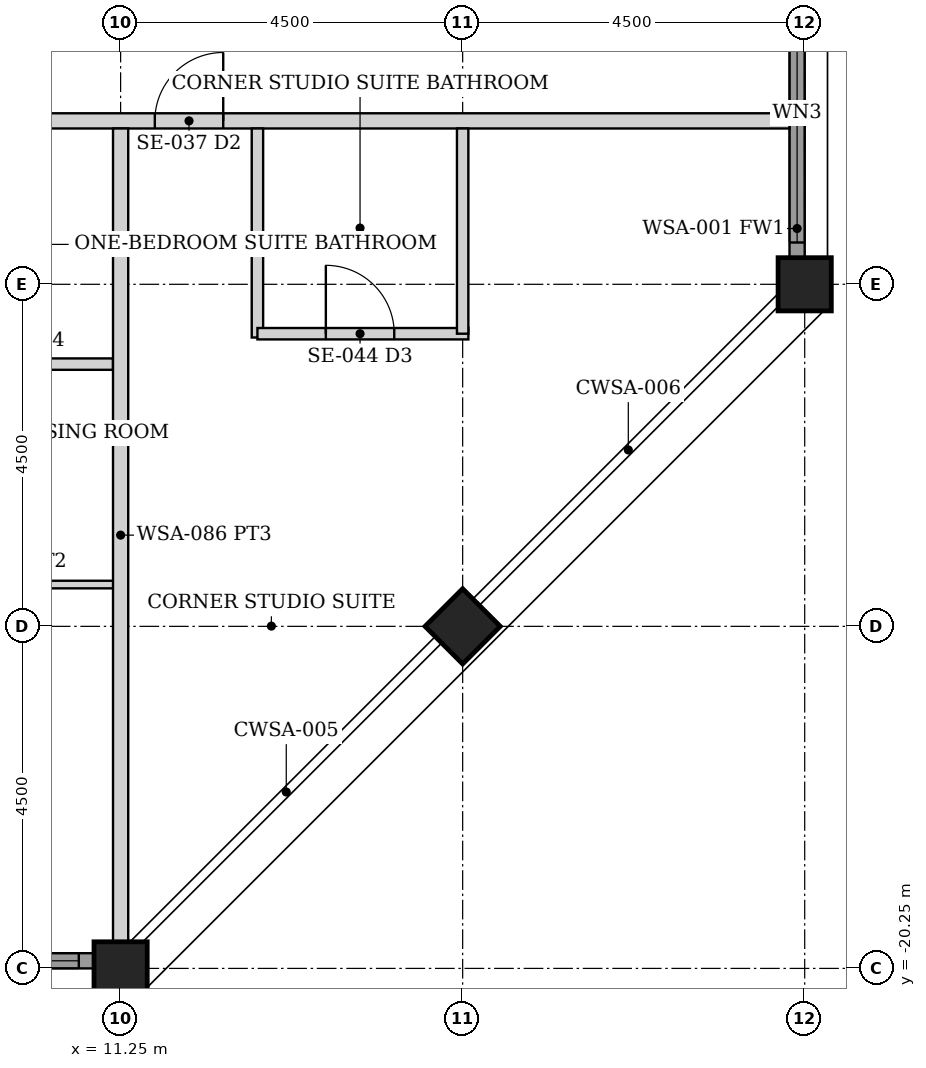
"""IFC4 building model, lengths in metres.
Left out: names, types, materials, properties, quantities, classifications, styles, units other than length and angle.
Written with IfcOpenShell. Run it as: python <this file> out.ifc"""

import sys

from ifc_helpers import new_model, si_unit, direction, frame, frame_2d, origin, origin_2d, place, context, subcontext, project, spatial, rectangle, hollow_rectangle, extrude, element, fill, save


model = new_model("IFC4")
c1 = context("Model", 3, precision=1e-05, world=origin(), true_north=direction((0.0, 1.0)))
c2 = subcontext(c1, "Body", "Model", "MODEL_VIEW")
j1 = project(units=[si_unit("LENGTHUNIT", "METRE"), si_unit("PLANEANGLEUNIT", "RADIAN")], contexts=[c1])
p1 = place(None, origin())
s1 = spatial("IfcSite", under=j1, at=p1, CompositionType="ELEMENT")
p2 = place(p1, origin())
s2 = spatial("IfcBuilding", under=s1, at=p2, CompositionType="ELEMENT")
p3 = place(p2, frame((0.0, 0.0, 245.8)))
s3 = spatial("IfcBuildingStorey", under=s2, at=p3, CompositionType="ELEMENT", Elevation=245.8)
for number, where, z_axis, x_axis in (
    (1, (20.25, -11.25, 0.0), (0.0, 0.0, 1.0), (1.0, 0.0, 0.0)),
    (2, (11.25, -20.25, 0.0), (0.0, 0.0, 1.0), (0.0, 1.0, 0.0)),
    (3, (15.75, -15.75, 0.0), (0.0, 0.0, 1.0), (0.707, -0.707, 0.0)),
):
    element("IfcColumn", number, at=place(p3, frame(where, z_axis=z_axis, x_axis=x_axis)), inside=s3, PredefinedType="COLUMN", context=c2, shape_type="SweptSolid", body=[
        extrude(hollow_rectangle(XDim=0.7, YDim=0.7, WallThickness=0.035, at=origin_2d()), origin(), (0.0, 0.0, 1.0), 3.75),
    ])
p4 = place(p3, frame((7.105, -20.15, 0.0), z_axis=(0.0, 0.0, 1.0), x_axis=(1.0, 0.0, 0.0)))
e4 = element("IfcWall", 4, at=p4, inside=s3, PredefinedType="SOLIDWALL", context=c2, shape_type="SweptSolid", body=[
    extrude(rectangle(XDim=3.79, YDim=0.2, at=frame_2d((1.895, 0.0))), origin(), (0.0, 0.0, 1.0), 2.629),
])
p5 = place(p4, frame((0.195, 0.0, 0.3)))
e5 = element("IfcOpeningElement", 5, at=p5, cuts=e4, PredefinedType="OPENING", context=c2, shape_type="SweptSolid", body=[
    extrude(rectangle(XDim=3.4, YDim=2.179, at=frame_2d((1.7, 1.089))), frame((0.0, 0.11, 0.0), z_axis=(0.0, -1.0, 0.0), x_axis=(1.0, 0.0, 0.0)), (0.0, 0.0, 1.0), 0.22),
])
p6 = place(p3, frame((20.15, -10.895, 0.0), z_axis=(0.0, 0.0, 1.0), x_axis=(0.0, 1.0, 0.0)))
e6 = element("IfcWall", 6, at=p6, inside=s3, PredefinedType="SOLIDWALL", context=c2, shape_type="SweptSolid", body=[
    extrude(rectangle(XDim=3.79, YDim=0.2, at=frame_2d((1.895, 0.0))), origin(), (0.0, 0.0, 1.0), 2.629),
])
p7 = place(p6, frame((0.195, 0.0, 0.3)))
e7 = element("IfcOpeningElement", 7, at=p7, cuts=e6, PredefinedType="OPENING", context=c2, shape_type="SweptSolid", body=[
    extrude(rectangle(XDim=3.4, YDim=2.179, at=frame_2d((1.7, 1.089))), frame((0.0, 0.11, 0.0), z_axis=(0.0, -1.0, 0.0), x_axis=(1.0, 0.0, 0.0)), (0.0, 0.0, 1.0), 0.22),
])
p8 = place(p3, frame((-20.05, -9.1, 0.0), z_axis=(0.0, 0.0, 1.0), x_axis=(1.0, 0.0, 0.0)))
e8 = element("IfcWall", 8, at=p8, inside=s3, PredefinedType="PARTITIONING", context=c2, shape_type="SweptSolid", body=[
    extrude(rectangle(XDim=40.1, YDim=0.2, at=frame_2d((20.05, 0.0))), origin(), (0.0, 0.0, 1.0), 2.629),
])
p9 = place(p8, frame((14.05, 0.0, 0.0)))
e9 = element("IfcOpeningElement", 9, at=p9, cuts=e8, PredefinedType="OPENING", context=c2, shape_type="SweptSolid", body=[
    extrude(rectangle(XDim=0.9, YDim=2.1, at=frame_2d((0.45, 1.05))), frame((0.0, 0.11, 0.0), z_axis=(0.0, -1.0, 0.0), x_axis=(1.0, 0.0, 0.0)), (0.0, 0.0, 1.0), 0.22),
])
p10 = place(p8, frame((23.05, 0.0, 0.0)))
e10 = element("IfcOpeningElement", 10, at=p10, cuts=e8, PredefinedType="OPENING", context=c2, shape_type="SweptSolid", body=[
    extrude(rectangle(XDim=0.9, YDim=2.1, at=frame_2d((0.45, 1.05))), frame((0.0, 0.11, 0.0), z_axis=(0.0, -1.0, 0.0), x_axis=(1.0, 0.0, 0.0)), (0.0, 0.0, 1.0), 0.22),
])
p11 = place(p8, frame((31.75, 0.0, 0.0)))
e11 = element("IfcOpeningElement", 11, at=p11, cuts=e8, PredefinedType="OPENING", context=c2, shape_type="SweptSolid", body=[
    extrude(rectangle(XDim=0.9, YDim=2.1, at=frame_2d((0.45, 1.05))), frame((0.0, 0.11, 0.0), z_axis=(0.0, -1.0, 0.0), x_axis=(1.0, 0.0, 0.0)), (0.0, 0.0, 1.0), 0.22),
])
p12 = place(p8, frame((7.45, 0.0, 0.0)))
e12 = element("IfcOpeningElement", 12, at=p12, cuts=e8, PredefinedType="OPENING", context=c2, shape_type="SweptSolid", body=[
    extrude(rectangle(XDim=0.9, YDim=2.1, at=frame_2d((0.45, 1.05))), frame((0.0, 0.11, 0.0), z_axis=(0.0, -1.0, 0.0), x_axis=(1.0, 0.0, 0.0)), (0.0, 0.0, 1.0), 0.22),
])
p13 = place(p3, frame((8.1, -12.3, 0.0), z_axis=(0.0, 0.0, 1.0), x_axis=(1.0, 0.0, 0.0)))
e13 = element("IfcWall", 13, at=p13, inside=s3, PredefinedType="PARTITIONING", context=c2, shape_type="SweptSolid", body=[
    extrude(rectangle(XDim=3.05, YDim=0.15, at=frame_2d((1.525, 0.0))), origin(), (0.0, 0.0, 1.0), 2.629),
])
p14 = place(p3, frame((8.05, -15.2, 0.0), z_axis=(0.0, 0.0, 1.0), x_axis=(1.0, 0.0, 0.0)))
e14 = element("IfcWall", 14, at=p14, inside=s3, PredefinedType="PARTITIONING", context=c2, shape_type="SweptSolid", body=[
    extrude(rectangle(XDim=3.2, YDim=0.1, at=frame_2d((1.6, 0.0))), origin(), (0.0, 0.0, 1.0), 2.629),
])
p15 = place(p3, frame((11.25, -19.9, 0.0), z_axis=(0.0, 0.0, 1.0), x_axis=(0.0, 1.0, 0.0)))
e15 = element("IfcWall", 15, at=p15, inside=s3, PredefinedType="PARTITIONING", context=c2, shape_type="SweptSolid", body=[
    extrude(rectangle(XDim=10.7, YDim=0.2, at=frame_2d((5.35, 0.0))), origin(), (0.0, 0.0, 1.0), 2.629),
])
p16 = place(p3, frame((13.05, -11.95, 0.0), z_axis=(0.0, 0.0, 1.0), x_axis=(0.0, 1.0, 0.0)))
e16 = element("IfcWall", 16, at=p16, inside=s3, PredefinedType="PARTITIONING", context=c2, shape_type="SweptSolid", body=[
    extrude(rectangle(XDim=2.75, YDim=0.15, at=frame_2d((1.375, 0.0))), origin(), (0.0, 0.0, 1.0), 2.629),
])
p17 = place(p3, frame((13.05, -11.9, 0.0), z_axis=(0.0, 0.0, 1.0), x_axis=(1.0, 0.0, 0.0)))
e17 = element("IfcWall", 17, at=p17, inside=s3, PredefinedType="PARTITIONING", context=c2, shape_type="SweptSolid", body=[
    extrude(rectangle(XDim=2.775, YDim=0.15, at=frame_2d((1.387, 0.0))), origin(), (0.0, 0.0, 1.0), 2.629),
])
p18 = place(p17, frame((0.9, 0.0, 0.0)))
e18 = element("IfcOpeningElement", 18, at=p18, cuts=e17, PredefinedType="OPENING", context=c2, shape_type="SweptSolid", body=[
    extrude(rectangle(XDim=0.9, YDim=2.1, at=frame_2d((0.45, 1.05))), frame((0.0, 0.085, 0.0), z_axis=(0.0, -1.0, 0.0), x_axis=(1.0, 0.0, 0.0)), (0.0, 0.0, 1.0), 0.17),
])
p19 = place(p3, frame((15.75, -11.9, 0.0), z_axis=(0.0, 0.0, 1.0), x_axis=(0.0, 1.0, 0.0)))
e19 = element("IfcWall", 19, at=p19, inside=s3, PredefinedType="PARTITIONING", context=c2, shape_type="SweptSolid", body=[
    extrude(rectangle(XDim=2.7, YDim=0.15, at=frame_2d((1.35, 0.0))), origin(), (0.0, 0.0, 1.0), 2.629),
])
p20 = place(p5, origin())
e20 = element("IfcWindow", 20, at=p20, inside=s3, PartitioningType="SINGLE_PANEL", PredefinedType="WINDOW", context=c2, shape_type="SweptSolid", body=[
    extrude(rectangle(XDim=3.4, YDim=2.179, at=frame_2d((1.7, 1.089))), frame((0.0, 0.03, 0.0), z_axis=(0.0, -1.0, 0.0), x_axis=(1.0, 0.0, 0.0)), (0.0, 0.0, 1.0), 0.06),
])
fill(e5, e20)
p21 = place(p7, origin())
e21 = element("IfcWindow", 21, at=p21, inside=s3, PartitioningType="SINGLE_PANEL", PredefinedType="WINDOW", context=c2, shape_type="SweptSolid", body=[
    extrude(rectangle(XDim=3.4, YDim=2.179, at=frame_2d((1.7, 1.089))), frame((0.0, 0.03, 0.0), z_axis=(0.0, -1.0, 0.0), x_axis=(1.0, 0.0, 0.0)), (0.0, 0.0, 1.0), 0.06),
])
fill(e7, e21)
p22 = place(p11, origin())
e22 = element("IfcDoor", 22, at=p22, inside=s3, OperationType="SINGLE_SWING_RIGHT", PredefinedType="DOOR", context=c2, shape_type="SweptSolid", body=[
    extrude(rectangle(XDim=0.9, YDim=2.1, at=frame_2d((0.45, 1.05))), frame((0.0, 0.025, 0.0), z_axis=(0.0, -1.0, 0.0), x_axis=(1.0, 0.0, 0.0)), (0.0, 0.0, 1.0), 0.05),
])
fill(e11, e22)
p23 = place(p18, origin())
e23 = element("IfcDoor", 23, at=p23, inside=s3, OperationType="SINGLE_SWING_LEFT", PredefinedType="DOOR", context=c2, shape_type="SweptSolid", body=[
    extrude(rectangle(XDim=0.9, YDim=2.1, at=frame_2d((0.45, 1.05))), frame((0.0, 0.025, 0.0), z_axis=(0.0, -1.0, 0.0), x_axis=(1.0, 0.0, 0.0)), (0.0, 0.0, 1.0), 0.05),
])
fill(e18, e23)
save(model, sys.argv[1])
